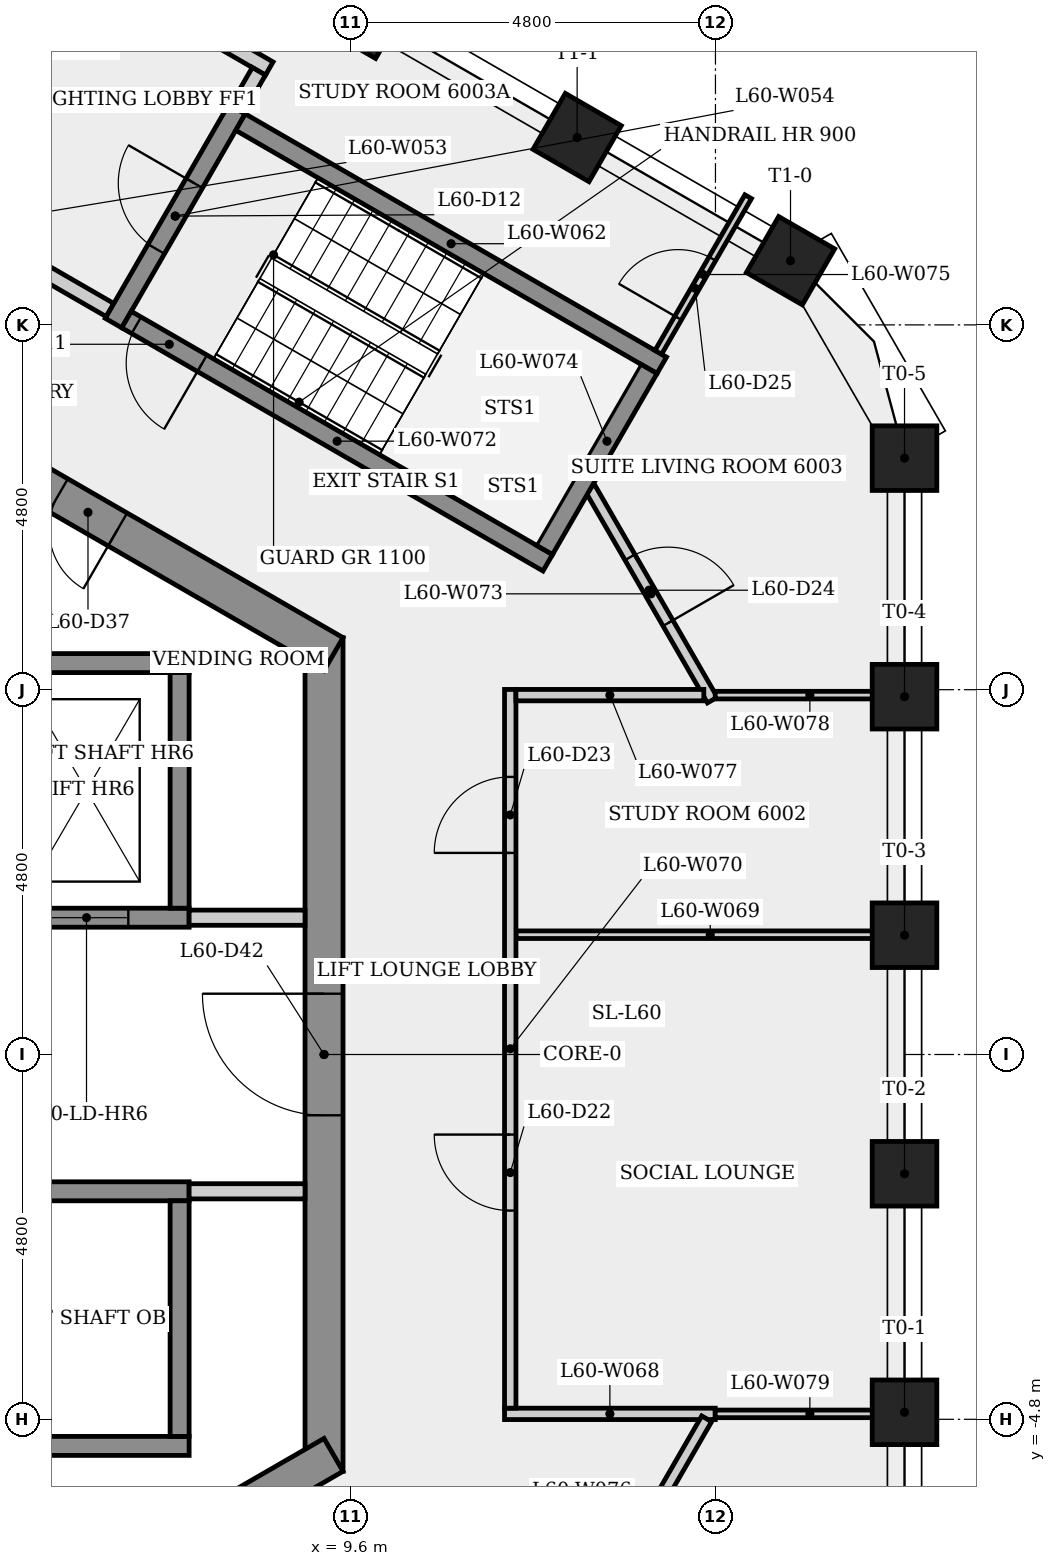
"""IFC4 building model, lengths in metres.
Left out: names, types, materials, properties, quantities, classifications, styles, units other than length and angle.
Written with IfcOpenShell. Run it as: python <this file> out.ifc"""

import sys

from ifc_helpers import new_model, si_unit, direction, frame, frame_2d, origin, origin_2d, place, context, subcontext, project, spatial, rectangle, extrude, element, fill, save


model = new_model("IFC4")
c1 = context("Model", 3, precision=1e-05, world=origin(), true_north=direction((0.0, 1.0)))
c2 = subcontext(c1, "Body", "Model", "MODEL_VIEW")
j1 = project(units=[si_unit("LENGTHUNIT", "METRE"), si_unit("PLANEANGLEUNIT", "RADIAN")], contexts=[c1])
p1 = place(None, origin())
s1 = spatial("IfcSite", under=j1, at=p1, CompositionType="ELEMENT")
p2 = place(p1, origin())
s2 = spatial("IfcBuilding", under=s1, at=p2, CompositionType="ELEMENT")
p3 = place(p2, frame((0.0, 0.0, 225.7)))
s3 = spatial("IfcBuildingStorey", under=s2, at=p3, CompositionType="ELEMENT", Elevation=225.7)
p4 = place(p3, frame((9.25, -5.485, 0.0), z_axis=(0.0, 0.0, 1.0), x_axis=(0.0, 1.0, 0.0)))
e1 = element("IfcWall", 1, at=p4, inside=s3, PredefinedType="SHEAR", context=c2, shape_type="SweptSolid", body=[
    extrude(rectangle(XDim=10.97, YDim=0.5, at=frame_2d((5.485, 0.0))), origin(), (0.0, 0.0, 1.0), 3.4),
])
p5 = place(p4, frame((4.685, 0.0, 0.0)))
e2 = element("IfcOpeningElement", 2, at=p5, cuts=e1, PredefinedType="OPENING", context=c2, shape_type="SweptSolid", body=[
    extrude(rectangle(XDim=1.6, YDim=2.1, at=frame_2d((0.8, 1.05))), frame((0.0, 0.26, 0.0), z_axis=(0.0, -1.0, 0.0), x_axis=(1.0, 0.0, 0.0)), (0.0, 0.0, 1.0), 0.52),
])
p6 = place(p3, frame((9.375, 5.268, 0.0), z_axis=(0.0, 0.0, 1.0), x_axis=(-0.866023993627, 0.500002442456, 0.0)))
e3 = element("IfcWall", 3, at=p6, inside=s3, PredefinedType="SHEAR", context=c2, shape_type="SweptSolid", body=[
    extrude(rectangle(XDim=10.97, YDim=0.5, at=frame_2d((5.485, 0.0))), origin(), (0.0, 0.0, 1.0), 3.4),
])
p7 = place(p6, frame((8.5, 0.0, 0.0)))
e4 = element("IfcOpeningElement", 4, at=p7, cuts=e3, PredefinedType="OPENING", context=c2, shape_type="SweptSolid", body=[
    extrude(rectangle(XDim=0.9, YDim=2.1, at=frame_2d((0.45, 1.05))), frame((0.0, 0.26, 0.0), z_axis=(0.0, -1.0, 0.0), x_axis=(1.0, 0.0, 0.0)), (0.0, 0.0, 1.0), 0.52),
])
p8 = place(p6, frame((3.28, 0.0, 0.0)))
e5 = element("IfcOpeningElement", 5, at=p8, cuts=e3, PredefinedType="OPENING", context=c2, shape_type="SweptSolid", body=[
    extrude(rectangle(XDim=0.9, YDim=2.1, at=frame_2d((0.45, 1.05))), frame((0.0, 0.26, 0.0), z_axis=(0.0, -1.0, 0.0), x_axis=(1.0, 0.0, 0.0)), (0.0, 0.0, 1.0), 0.52),
])
p9 = place(p3, frame((-0.125, -10.753, 0.0), z_axis=(0.0, 0.0, 1.0), x_axis=(0.866023993627, 0.500002442456, 0.0)))
e6 = element("IfcWall", 6, at=p9, inside=s3, PredefinedType="SHEAR", context=c2, shape_type="SweptSolid", body=[
    extrude(rectangle(XDim=10.97, YDim=0.5, at=frame_2d((5.485, 0.0))), origin(), (0.0, 0.0, 1.0), 3.4),
])
p10 = place(p9, frame((7.195, 0.0, 0.0)))
e7 = element("IfcOpeningElement", 7, at=p10, cuts=e6, PredefinedType="OPENING", context=c2, shape_type="SweptSolid", body=[
    extrude(rectangle(XDim=0.9, YDim=2.1, at=frame_2d((0.45, 1.05))), frame((0.0, 0.26, 0.0), z_axis=(0.0, -1.0, 0.0), x_axis=(1.0, 0.0, 0.0)), (0.0, 0.0, 1.0), 0.52),
])
for number, where, z_axis, x_axis in (
    (8, (16.887, -4.708, 0.0), (0.0, 0.0, 1.0), (1.0, 0.0, 0.0)),
    (9, (16.887, -1.569, 0.0), (0.0, 0.0, 1.0), (1.0, 0.0, 0.0)),
    (10, (16.887, 1.569, 0.0), (0.0, 0.0, 1.0), (1.0, 0.0, 0.0)),
    (11, (16.887, 4.708, 0.0), (0.0, 0.0, 1.0), (1.0, 0.0, 0.0)),
    (12, (16.887, 7.847, 0.0), (0.0, 0.0, 1.0), (1.0, 0.0, 0.0)),
    (13, (15.387, 10.445, 0.0), (0.0, 0.0, 1.0), (0.5, 0.866, 0.0)),
    (14, (12.58, 12.065, 0.0), (0.0, 0.0, 1.0), (0.5, 0.866, 0.0)),
    (15, (9.773, 13.686, 0.0), (0.0, 0.0, 1.0), (0.5, 0.866, 0.0)),
):
    element("IfcColumn", number, at=place(p3, frame(where, z_axis=z_axis, x_axis=x_axis)), inside=s3, PredefinedType="COLUMN", context=c2, shape_type="SweptSolid", body=[
        extrude(rectangle(XDim=0.85, YDim=0.85, at=origin_2d()), origin(), (0.0, 0.0, 1.0), 3.4),
    ])
p11 = place(p3, frame((-7.475, 1.8, 0.0), z_axis=(0.0, 0.0, 1.0), x_axis=(1.0, 0.0, 0.0)))
e16 = element("IfcWall", 16, at=p11, inside=s3, PredefinedType="SHEAR", context=c2, shape_type="SweptSolid", body=[
    extrude(rectangle(XDim=14.95, YDim=0.25, at=frame_2d((7.475, 0.0))), origin(), (0.0, 0.0, 1.0), 3.05),
])
p12 = place(p11, frame((0.8, 0.0, 0.0)))
e17 = element("IfcOpeningElement", 17, at=p12, cuts=e16, PredefinedType="OPENING", context=c2, shape_type="SweptSolid", body=[
    extrude(rectangle(XDim=1.1, YDim=2.1, at=frame_2d((0.55, 1.05))), frame((0.0, 0.135, 0.0), z_axis=(0.0, -1.0, 0.0), x_axis=(1.0, 0.0, 0.0)), (0.0, 0.0, 1.0), 0.27),
])
p13 = place(p11, frame((3.25, 0.0, 0.0)))
e18 = element("IfcOpeningElement", 18, at=p13, cuts=e16, PredefinedType="OPENING", context=c2, shape_type="SweptSolid", body=[
    extrude(rectangle(XDim=1.1, YDim=2.1, at=frame_2d((0.55, 1.05))), frame((0.0, 0.135, 0.0), z_axis=(0.0, -1.0, 0.0), x_axis=(1.0, 0.0, 0.0)), (0.0, 0.0, 1.0), 0.27),
])
p14 = place(p11, frame((5.7, 0.0, 0.0)))
e19 = element("IfcOpeningElement", 19, at=p14, cuts=e16, PredefinedType="OPENING", context=c2, shape_type="SweptSolid", body=[
    extrude(rectangle(XDim=1.1, YDim=2.1, at=frame_2d((0.55, 1.05))), frame((0.0, 0.135, 0.0), z_axis=(0.0, -1.0, 0.0), x_axis=(1.0, 0.0, 0.0)), (0.0, 0.0, 1.0), 0.27),
])
p15 = place(p11, frame((8.15, 0.0, 0.0)))
e20 = element("IfcOpeningElement", 20, at=p15, cuts=e16, PredefinedType="OPENING", context=c2, shape_type="SweptSolid", body=[
    extrude(rectangle(XDim=1.1, YDim=2.1, at=frame_2d((0.55, 1.05))), frame((0.0, 0.135, 0.0), z_axis=(0.0, -1.0, 0.0), x_axis=(1.0, 0.0, 0.0)), (0.0, 0.0, 1.0), 0.27),
])
p16 = place(p11, frame((10.6, 0.0, 0.0)))
e21 = element("IfcOpeningElement", 21, at=p16, cuts=e16, PredefinedType="OPENING", context=c2, shape_type="SweptSolid", body=[
    extrude(rectangle(XDim=1.1, YDim=2.1, at=frame_2d((0.55, 1.05))), frame((0.0, 0.135, 0.0), z_axis=(0.0, -1.0, 0.0), x_axis=(1.0, 0.0, 0.0)), (0.0, 0.0, 1.0), 0.27),
])
p17 = place(p11, frame((13.05, 0.0, 0.0)))
e22 = element("IfcOpeningElement", 22, at=p17, cuts=e16, PredefinedType="OPENING", context=c2, shape_type="SweptSolid", body=[
    extrude(rectangle(XDim=1.1, YDim=2.1, at=frame_2d((0.55, 1.05))), frame((0.0, 0.135, 0.0), z_axis=(0.0, -1.0, 0.0), x_axis=(1.0, 0.0, 0.0)), (0.0, 0.0, 1.0), 0.27),
])
p18 = place(p3, frame((-7.225, 5.15, 0.0), z_axis=(0.0, 0.0, 1.0), x_axis=(1.0, 0.0, 0.0)))
e23 = element("IfcWall", 23, at=p18, inside=s3, PredefinedType="SHEAR", context=c2, shape_type="SweptSolid", body=[
    extrude(rectangle(XDim=14.7, YDim=0.25, at=frame_2d((7.35, 0.0))), origin(), (0.0, 0.0, 1.0), 3.05),
])
p19 = place(p3, frame((4.459, 15.323, 0.0), z_axis=(0.0, 0.0, 1.0), x_axis=(0.866016039709, -0.500016218704, 0.0)))
e24 = element("IfcWall", 24, at=p19, inside=s3, PredefinedType="PARTITIONING", context=c2, shape_type="SweptSolid", body=[
    extrude(rectangle(XDim=4.7, YDim=0.2, at=frame_2d((2.35, 0.0))), origin(), (0.0, 0.0, 1.0), 3.05),
])
p20 = place(p3, frame((2.575, -5.15, 0.0), z_axis=(0.0, 0.0, 1.0), x_axis=(1.0, 0.0, 0.0)))
e25 = element("IfcWall", 25, at=p20, inside=s3, PredefinedType="SHEAR", context=c2, shape_type="SweptSolid", body=[
    extrude(rectangle(XDim=4.9, YDim=0.25, at=frame_2d((2.45, 0.0))), origin(), (0.0, 0.0, 1.0), 3.05),
])
p21 = place(p3, frame((2.575, -1.8, 0.0), z_axis=(0.0, 0.0, 1.0), x_axis=(1.0, 0.0, 0.0)))
e26 = element("IfcWall", 26, at=p21, inside=s3, PredefinedType="SHEAR", context=c2, shape_type="SweptSolid", body=[
    extrude(rectangle(XDim=4.9, YDim=0.25, at=frame_2d((2.45, 0.0))), origin(), (0.0, 0.0, 1.0), 3.05),
])
p22 = place(p21, frame((0.597, 0.0, 0.0)))
e27 = element("IfcOpeningElement", 27, at=p22, cuts=e26, PredefinedType="OPENING", context=c2, shape_type="SweptSolid", body=[
    extrude(rectangle(XDim=1.1, YDim=2.1, at=frame_2d((0.55, 1.05))), frame((0.0, 0.135, 0.0), z_axis=(0.0, -1.0, 0.0), x_axis=(1.0, 0.0, 0.0)), (0.0, 0.0, 1.0), 0.27),
])
p23 = place(p3, frame((6.435, 9.795, 0.0), z_axis=(0.0, 0.0, 1.0), x_axis=(-0.866012907634, 0.500021643343, 0.0)))
e28 = element("IfcWall", 28, at=p23, inside=s3, PredefinedType="PARTITIONING", context=c2, shape_type="SweptSolid", body=[
    extrude(rectangle(XDim=4.45, YDim=0.2, at=frame_2d((2.225, 0.0))), origin(), (0.0, 0.0, 1.0), 3.05),
])
p24 = place(p23, frame((1.675, 0.0, 0.0)))
e29 = element("IfcOpeningElement", 29, at=p24, cuts=e28, PredefinedType="OPENING", context=c2, shape_type="SweptSolid", body=[
    extrude(rectangle(XDim=1.1, YDim=2.1, at=frame_2d((0.55, 1.05))), frame((0.0, 0.11, 0.0), z_axis=(0.0, -1.0, 0.0), x_axis=(1.0, 0.0, 0.0)), (0.0, 0.0, 1.0), 0.22),
])
p25 = place(p3, frame((6.48, 9.624, 0.0), z_axis=(0.0, 0.0, 1.0), x_axis=(0.500017246033, 0.866015446554, 0.0)))
e30 = element("IfcWall", 30, at=p25, inside=s3, PredefinedType="SHEAR", context=c2, shape_type="SweptSolid", body=[
    extrude(rectangle(XDim=3.25, YDim=0.25, at=frame_2d((1.625, 0.0))), origin(), (0.0, 0.0, 1.0), 3.05),
])
p26 = place(p25, frame((1.125, 0.0, 0.0)))
e31 = element("IfcOpeningElement", 31, at=p26, cuts=e30, PredefinedType="OPENING", context=c2, shape_type="SweptSolid", body=[
    extrude(rectangle(XDim=1.0, YDim=2.1, at=frame_2d((0.5, 1.05))), frame((0.0, 0.135, 0.0), z_axis=(0.0, -1.0, 0.0), x_axis=(1.0, 0.0, 0.0)), (0.0, 0.0, 1.0), 0.27),
])
p27 = place(p3, frame((7.475, 1.8, 0.0), z_axis=(0.0, 0.0, 1.0), x_axis=(1.0, 0.0, 0.0)))
e32 = element("IfcWall", 32, at=p27, inside=s3, PredefinedType="PARTITIONING", context=c2, shape_type="SweptSolid", body=[
    extrude(rectangle(XDim=1.525, YDim=0.2, at=frame_2d((0.763, 0.0))), origin(), (0.0, 0.0, 1.0), 3.05),
])
for number, where, z_axis, x_axis in (
    (33, (7.35, -1.925, 0.0), (0.0, 0.0, 1.0), (0.0, -1.0, 0.0)),
    (34, (7.35, 5.025, 0.0), (0.0, 0.0, 1.0), (0.0, -1.0, 0.0)),
):
    element("IfcWall", number, at=place(p3, frame(where, z_axis=z_axis, x_axis=x_axis)), inside=s3, PredefinedType="SHEAR", context=c2, shape_type="SweptSolid", body=[
        extrude(rectangle(XDim=3.1, YDim=0.25, at=frame_2d((1.55, 0.0))), origin(), (0.0, 0.0, 1.0), 3.4),
    ])
p28 = place(p3, frame((8.151, 12.268, 0.0), z_axis=(0.0, 0.0, 1.0), x_axis=(0.866025499775, -0.499999833739, 0.0)))
e35 = element("IfcWall", 35, at=p28, inside=s3, PredefinedType="SHEAR", context=c2, shape_type="SweptSolid", body=[
    extrude(rectangle(XDim=6.4, YDim=0.25, at=frame_2d((3.2, 0.0))), origin(), (0.0, 0.0, 1.0), 3.05),
])
p29 = place(p3, frame((8.393, 12.937, 0.0), z_axis=(0.0, 0.0, 1.0), x_axis=(-0.500065409566, -0.86598763626, 0.0)))
e36 = element("IfcWall", 36, at=p29, inside=s3, PredefinedType="PARTITIONING", context=c2, shape_type="SweptSolid", body=[
    extrude(rectangle(XDim=0.575, YDim=0.2, at=frame_2d((0.288, 0.0))), origin(), (0.0, 0.0, 1.0), 3.05),
])
p30 = place(p3, frame((9.0, -1.8, 0.0), z_axis=(0.0, 0.0, 1.0), x_axis=(-1.0, 0.0, 0.0)))
e37 = element("IfcWall", 37, at=p30, inside=s3, PredefinedType="PARTITIONING", context=c2, shape_type="SweptSolid", body=[
    extrude(rectangle(XDim=1.525, YDim=0.2, at=frame_2d((0.763, 0.0))), origin(), (0.0, 0.0, 1.0), 3.05),
])
p31 = place(p3, frame((11.625, -4.729, 0.0), z_axis=(0.0, 0.0, 1.0), x_axis=(1.0, 0.0, 0.0)))
e38 = element("IfcWall", 38, at=p31, inside=s3, PredefinedType="PARTITIONING", context=c2, shape_type="SweptSolid", body=[
    extrude(rectangle(XDim=2.772, YDim=0.15, at=frame_2d((1.386, 0.0))), origin(), (0.0, 0.0, 1.0), 3.05),
])
p32 = place(p3, frame((11.775, 1.576, 0.0), z_axis=(0.0, 0.0, 1.0), x_axis=(1.0, 0.0, 0.0)))
e39 = element("IfcWall", 39, at=p32, inside=s3, PredefinedType="PARTITIONING", context=c2, shape_type="SweptSolid", body=[
    extrude(rectangle(XDim=5.113, YDim=0.1, at=frame_2d((2.556, 0.0))), origin(), (0.0, 0.0, 1.0), 3.05),
])
p33 = place(p3, frame((11.7, -4.654, 0.0), z_axis=(0.0, 0.0, 1.0), x_axis=(0.0, 1.0, 0.0)))
e40 = element("IfcWall", 40, at=p33, inside=s3, PredefinedType="PARTITIONING", context=c2, shape_type="SweptSolid", body=[
    extrude(rectangle(XDim=9.457, YDim=0.15, at=frame_2d((4.729, 0.0))), origin(), (0.0, 0.0, 1.0), 3.05),
])
p34 = place(p33, frame((2.6, 0.0, 0.0)))
e41 = element("IfcOpeningElement", 41, at=p34, cuts=e40, PredefinedType="OPENING", context=c2, shape_type="SweptSolid", body=[
    extrude(rectangle(XDim=1.0, YDim=2.1, at=frame_2d((0.5, 1.05))), frame((0.0, 0.085, 0.0), z_axis=(0.0, -1.0, 0.0), x_axis=(1.0, 0.0, 0.0)), (0.0, 0.0, 1.0), 0.17),
])
p35 = place(p33, frame((7.306, 0.0, 0.0)))
e42 = element("IfcOpeningElement", 42, at=p35, cuts=e40, PredefinedType="OPENING", context=c2, shape_type="SweptSolid", body=[
    extrude(rectangle(XDim=1.0, YDim=2.1, at=frame_2d((0.5, 1.05))), frame((0.0, 0.085, 0.0), z_axis=(0.0, -1.0, 0.0), x_axis=(1.0, 0.0, 0.0)), (0.0, 0.0, 1.0), 0.17),
])
p36 = place(p3, frame((12.194, 6.47, 0.0), z_axis=(0.0, 0.0, 1.0), x_axis=(-0.866025499775, 0.499999833739, 0.0)))
e43 = element("IfcWall", 43, at=p36, inside=s3, PredefinedType="SHEAR", context=c2, shape_type="SweptSolid", body=[
    extrude(rectangle(XDim=6.4, YDim=0.25, at=frame_2d((3.2, 0.0))), origin(), (0.0, 0.0, 1.0), 3.05),
])
p37 = place(p36, frame((5.25, 0.0, 0.0)))
e44 = element("IfcOpeningElement", 44, at=p37, cuts=e43, PredefinedType="OPENING", context=c2, shape_type="SweptSolid", body=[
    extrude(rectangle(XDim=1.0, YDim=2.1, at=frame_2d((0.5, 1.05))), frame((0.0, 0.135, 0.0), z_axis=(0.0, -1.0, 0.0), x_axis=(1.0, 0.0, 0.0)), (0.0, 0.0, 1.0), 0.27),
])
p38 = place(p3, frame((12.745, 7.459, 0.0), z_axis=(0.0, 0.0, 1.0), x_axis=(0.500019253631, -0.86601428741, 0.0)))
e45 = element("IfcWall", 45, at=p38, inside=s3, PredefinedType="PARTITIONING", context=c2, shape_type="SweptSolid", body=[
    extrude(rectangle(XDim=3.228, YDim=0.15, at=frame_2d((1.614, 0.0))), origin(), (0.0, 0.0, 1.0), 3.05),
])
p39 = place(p38, frame((1.059, 0.0, 0.0)))
e46 = element("IfcOpeningElement", 46, at=p39, cuts=e45, PredefinedType="OPENING", context=c2, shape_type="SweptSolid", body=[
    extrude(rectangle(XDim=1.0, YDim=2.1, at=frame_2d((0.5, 1.05))), frame((0.0, 0.085, 0.0), z_axis=(0.0, -1.0, 0.0), x_axis=(1.0, 0.0, 0.0)), (0.0, 0.0, 1.0), 0.17),
])
p40 = place(p3, frame((12.148, 6.641, 0.0), z_axis=(0.0, 0.0, 1.0), x_axis=(0.500034990121, 0.866005201286, 0.0)))
e47 = element("IfcWall", 47, at=p40, inside=s3, PredefinedType="SHEAR", context=c2, shape_type="SweptSolid", body=[
    extrude(rectangle(XDim=2.75, YDim=0.25, at=frame_2d((1.375, 0.0))), origin(), (0.0, 0.0, 1.0), 3.05),
])
p41 = place(p3, frame((13.648, 9.239, 0.0), z_axis=(0.0, 0.0, 1.0), x_axis=(0.50004711805, 0.865998198456, 0.0)))
e48 = element("IfcWall", 48, at=p41, inside=s3, PredefinedType="PARTITIONING", context=c2, shape_type="SweptSolid", body=[
    extrude(rectangle(XDim=2.365, YDim=0.1, at=frame_2d((1.183, 0.0))), origin(), (0.0, 0.0, 1.0), 3.05),
])
p42 = place(p41, frame((0.522, 0.0, 0.0)))
e49 = element("IfcOpeningElement", 49, at=p42, cuts=e48, PredefinedType="OPENING", context=c2, shape_type="SweptSolid", body=[
    extrude(rectangle(XDim=0.9, YDim=2.1, at=frame_2d((0.45, 1.05))), frame((0.0, 0.06, 0.0), z_axis=(0.0, -1.0, 0.0), x_axis=(1.0, 0.0, 0.0)), (0.0, 0.0, 1.0), 0.12),
])
p43 = place(p3, frame((14.284, -4.793, 0.0), z_axis=(0.0, 0.0, 1.0), x_axis=(-0.500017439519, -0.866015334839, 0.0)))
e50 = element("IfcWall", 50, at=p43, inside=s3, PredefinedType="PARTITIONING", context=c2, shape_type="SweptSolid", body=[
    extrude(rectangle(XDim=6.567, YDim=0.15, at=frame_2d((3.284, 0.0))), origin(), (0.0, 0.0, 1.0), 3.05),
])
p44 = place(p43, frame((2.784, 0.0, 0.0)))
e51 = element("IfcOpeningElement", 51, at=p44, cuts=e50, PredefinedType="OPENING", context=c2, shape_type="SweptSolid", body=[
    extrude(rectangle(XDim=1.0, YDim=2.1, at=frame_2d((0.5, 1.05))), frame((0.0, 0.085, 0.0), z_axis=(0.0, -1.0, 0.0), x_axis=(1.0, 0.0, 0.0)), (0.0, 0.0, 1.0), 0.17),
])
p45 = place(p3, frame((14.247, 4.729, 0.0), z_axis=(0.0, 0.0, 1.0), x_axis=(-1.0, 0.0, 0.0)))
e52 = element("IfcWall", 52, at=p45, inside=s3, PredefinedType="PARTITIONING", context=c2, shape_type="SweptSolid", body=[
    extrude(rectangle(XDim=2.472, YDim=0.15, at=frame_2d((1.236, 0.0))), origin(), (0.0, 0.0, 1.0), 3.05),
])
p46 = place(p3, frame((14.397, 4.729, 0.0), z_axis=(0.0, 0.0, 1.0), x_axis=(1.0, 0.0, 0.0)))
e53 = element("IfcWall", 53, at=p46, inside=s3, PredefinedType="PARTITIONING", context=c2, shape_type="SweptSolid", body=[
    extrude(rectangle(XDim=2.49, YDim=0.1, at=frame_2d((1.245, 0.0))), origin(), (0.0, 0.0, 1.0), 3.05),
])
p47 = place(p3, frame((16.887, -4.729, 0.0), z_axis=(0.0, 0.0, 1.0), x_axis=(-1.0, 0.0, 0.0)))
e54 = element("IfcWall", 54, at=p47, inside=s3, PredefinedType="PARTITIONING", context=c2, shape_type="SweptSolid", body=[
    extrude(rectangle(XDim=2.491, YDim=0.1, at=frame_2d((1.245, 0.0))), origin(), (0.0, 0.0, 1.0), 3.05),
])
p48 = place(p17, origin())
e55 = element("IfcDoor", 55, at=p48, inside=s3, OperationType="SLIDING_TO_LEFT", PredefinedType="DOOR", context=c2, shape_type="SweptSolid", body=[
    extrude(rectangle(XDim=1.1, YDim=2.1, at=frame_2d((0.55, 1.05))), frame((0.0, 0.025, 0.0), z_axis=(0.0, -1.0, 0.0), x_axis=(1.0, 0.0, 0.0)), (0.0, 0.0, 1.0), 0.05),
])
fill(e22, e55)
p49 = place(p37, origin())
e56 = element("IfcDoor", 56, at=p49, inside=s3, OperationType="SINGLE_SWING_LEFT", PredefinedType="DOOR", context=c2, shape_type="SweptSolid", body=[
    extrude(rectangle(XDim=1.0, YDim=2.1, at=frame_2d((0.5, 1.05))), frame((0.0, 0.025, 0.0), z_axis=(0.0, -1.0, 0.0), x_axis=(1.0, 0.0, 0.0)), (0.0, 0.0, 1.0), 0.05),
])
fill(e44, e56)
p50 = place(p26, origin())
e57 = element("IfcDoor", 57, at=p50, inside=s3, OperationType="SINGLE_SWING_RIGHT", PredefinedType="DOOR", context=c2, shape_type="SweptSolid", body=[
    extrude(rectangle(XDim=1.0, YDim=2.1, at=frame_2d((0.5, 1.05))), frame((0.0, 0.025, 0.0), z_axis=(0.0, -1.0, 0.0), x_axis=(1.0, 0.0, 0.0)), (0.0, 0.0, 1.0), 0.05),
])
fill(e31, e57)
p51 = place(p34, origin())
e58 = element("IfcDoor", 58, at=p51, inside=s3, OperationType="SINGLE_SWING_RIGHT", PredefinedType="DOOR", context=c2, shape_type="SweptSolid", body=[
    extrude(rectangle(XDim=1.0, YDim=2.1, at=frame_2d((0.5, 1.05))), frame((0.0, 0.025, 0.0), z_axis=(0.0, -1.0, 0.0), x_axis=(1.0, 0.0, 0.0)), (0.0, 0.0, 1.0), 0.05),
])
fill(e41, e58)
p52 = place(p35, origin())
e59 = element("IfcDoor", 59, at=p52, inside=s3, OperationType="SINGLE_SWING_LEFT", PredefinedType="DOOR", context=c2, shape_type="SweptSolid", body=[
    extrude(rectangle(XDim=1.0, YDim=2.1, at=frame_2d((0.5, 1.05))), frame((0.0, 0.025, 0.0), z_axis=(0.0, -1.0, 0.0), x_axis=(1.0, 0.0, 0.0)), (0.0, 0.0, 1.0), 0.05),
])
fill(e42, e59)
p53 = place(p39, origin())
e60 = element("IfcDoor", 60, at=p53, inside=s3, OperationType="SINGLE_SWING_RIGHT", PredefinedType="DOOR", context=c2, shape_type="SweptSolid", body=[
    extrude(rectangle(XDim=1.0, YDim=2.1, at=frame_2d((0.5, 1.05))), frame((0.0, 0.025, 0.0), z_axis=(0.0, -1.0, 0.0), x_axis=(1.0, 0.0, 0.0)), (0.0, 0.0, 1.0), 0.05),
])
fill(e46, e60)
p54 = place(p42, origin())
e61 = element("IfcDoor", 61, at=p54, inside=s3, OperationType="SINGLE_SWING_LEFT", PredefinedType="DOOR", context=c2, shape_type="SweptSolid", body=[
    extrude(rectangle(XDim=0.9, YDim=2.1, at=frame_2d((0.45, 1.05))), frame((0.0, 0.025, 0.0), z_axis=(0.0, -1.0, 0.0), x_axis=(1.0, 0.0, 0.0)), (0.0, 0.0, 1.0), 0.05),
])
fill(e49, e61)
p55 = place(p8, origin())
e62 = element("IfcDoor", 62, at=p55, inside=s3, OperationType="SINGLE_SWING_LEFT", PredefinedType="DOOR", context=c2, shape_type="SweptSolid", body=[
    extrude(rectangle(XDim=0.9, YDim=2.1, at=frame_2d((0.45, 1.05))), frame((0.0, 0.025, 0.0), z_axis=(0.0, -1.0, 0.0), x_axis=(1.0, 0.0, 0.0)), (0.0, 0.0, 1.0), 0.05),
])
fill(e5, e62)
p56 = place(p5, origin())
e63 = element("IfcDoor", 63, at=p56, inside=s3, OperationType="SINGLE_SWING_RIGHT", PredefinedType="DOOR", context=c2, shape_type="SweptSolid", body=[
    extrude(rectangle(XDim=1.6, YDim=2.1, at=frame_2d((0.8, 1.05))), frame((0.0, 0.025, 0.0), z_axis=(0.0, -1.0, 0.0), x_axis=(1.0, 0.0, 0.0)), (0.0, 0.0, 1.0), 0.05),
])
fill(e2, e63)
save(model, sys.argv[1])
